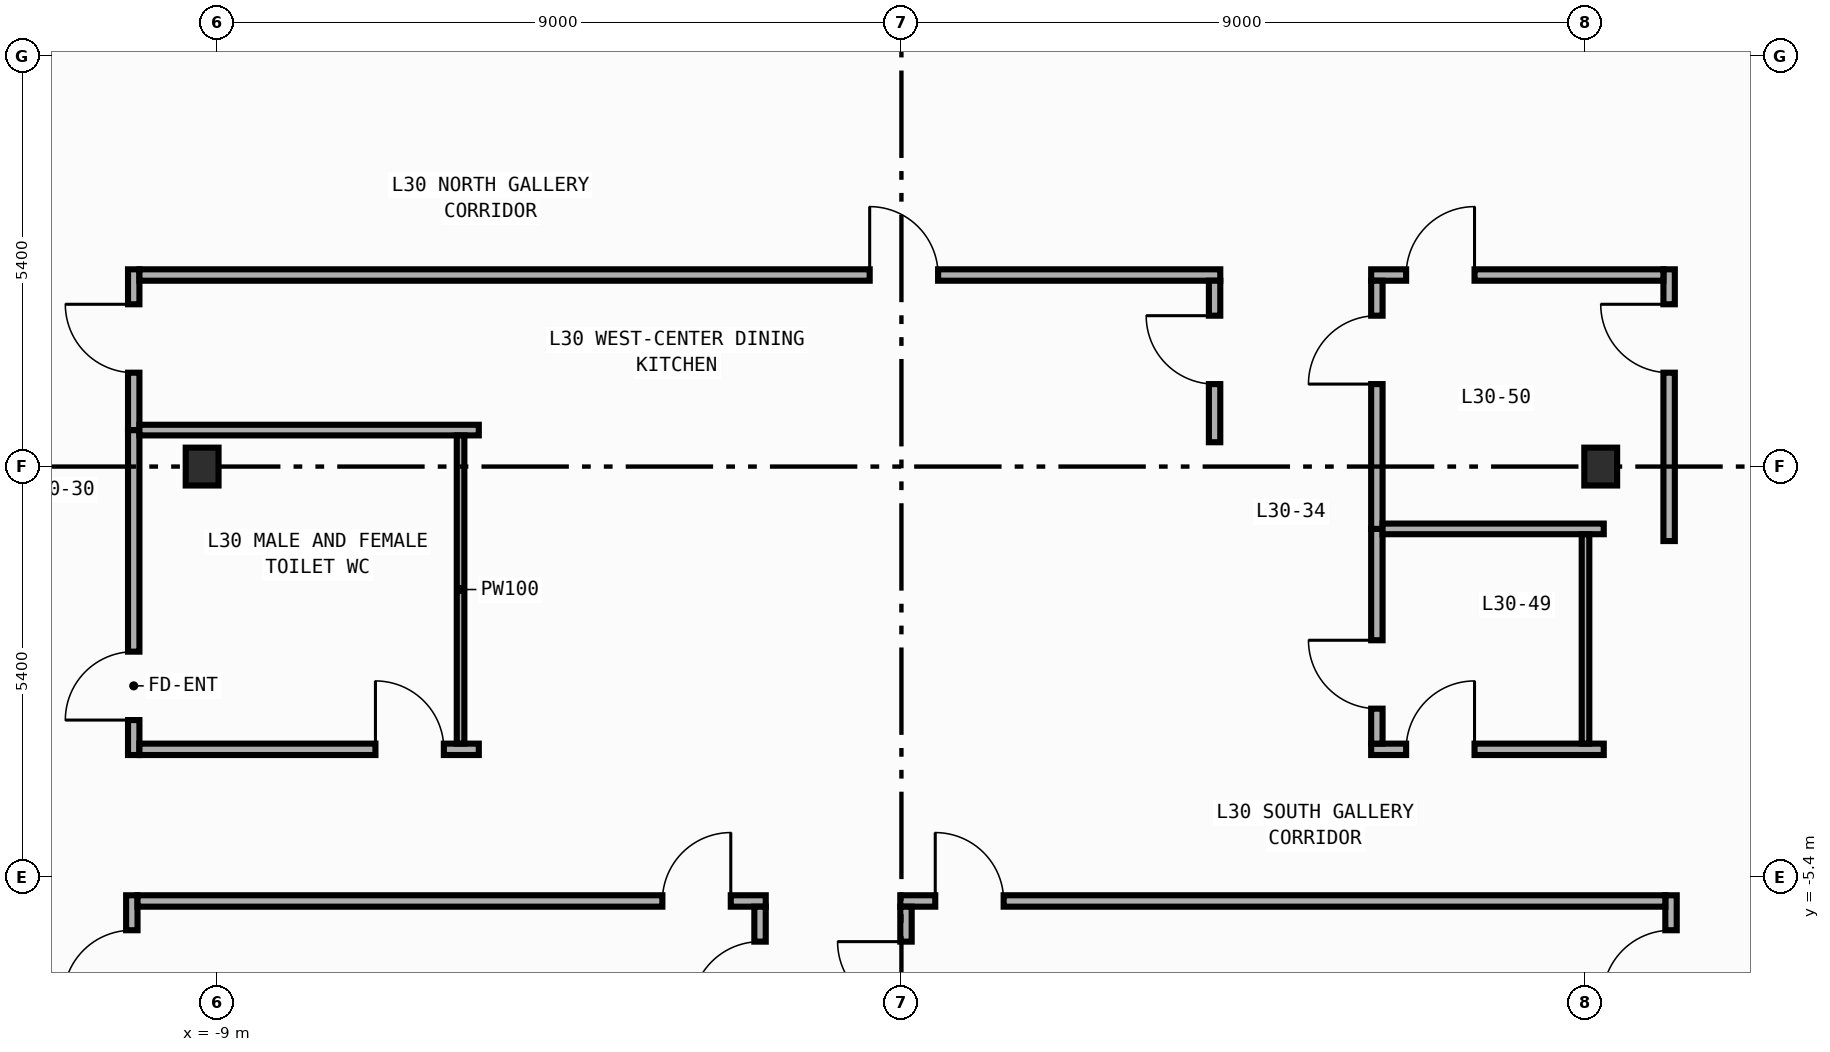
"""IFC4 building model, lengths in metres.
Left out: names, types, materials, properties, quantities, classifications, styles, units other than length and angle.
Written with IfcOpenShell. Run it as: python <this file> out.ifc"""

import sys

from ifc_helpers import new_model, si_unit, direction, frame, frame_2d, origin, origin_2d, place, context, subcontext, project, spatial, rectangle, i_section, extrude, element, fill, save


model = new_model("IFC4")
c1 = context("Model", 3, precision=1e-05, world=origin(), true_north=direction((0.0, 1.0)))
c2 = subcontext(c1, "Body", "Model", "MODEL_VIEW")
j1 = project(units=[si_unit("LENGTHUNIT", "METRE"), si_unit("PLANEANGLEUNIT", "RADIAN")], contexts=[c1])
p1 = place(None, origin())
s1 = spatial("IfcSite", under=j1, at=p1, CompositionType="ELEMENT")
p2 = place(p1, origin())
s2 = spatial("IfcBuilding", under=s1, at=p2, CompositionType="ELEMENT")
p3 = place(p2, frame((0.0, 0.0, 131.0)))
s3 = spatial("IfcBuildingStorey", under=s2, at=p3, CompositionType="ELEMENT", Elevation=131.0)
for number, where, z_axis, x_axis in (
    (1, (-9.2, 0.0, 0.0), (0.0, 0.0, 1.0), (1.0, 0.0, 0.0)),
    (2, (9.2, 0.0, 0.0), (0.0, 0.0, 1.0), (1.0, 0.0, 0.0)),
):
    element("IfcColumn", number, at=place(p3, frame(where, z_axis=z_axis, x_axis=x_axis)), inside=s3, PredefinedType="COLUMN", context=c2, shape_type="SweptSolid", body=[
        extrude(i_section(OverallWidth=0.432, OverallDepth=0.498, WebThickness=0.045, FlangeThickness=0.07, FilletRadius=0.022, at=origin_2d()), origin(), (0.0, 0.0, 1.0), 4.2),
    ])
p4 = place(p3, frame((-10.1, -3.795, 0.0), z_axis=(0.0, 0.0, 1.0), x_axis=(0.0, 1.0, 0.0)))
e3 = element("IfcWall", 3, at=p4, inside=s3, PredefinedType="PARTITIONING", context=c2, shape_type="SweptSolid", body=[
    extrude(rectangle(XDim=4.275, YDim=0.15, at=frame_2d((2.137, 0.0))), origin(), (0.0, 0.0, 1.0), 3.94),
])
p5 = place(p4, frame((0.46, 0.0, 0.0)))
e4 = element("IfcOpeningElement", 4, at=p5, cuts=e3, PredefinedType="OPENING", context=c2, shape_type="SweptSolid", body=[
    extrude(rectangle(XDim=0.9, YDim=2.15, at=frame_2d((0.45, 1.075))), frame((0.0, 0.085, 0.0), z_axis=(0.0, -1.0, 0.0), x_axis=(1.0, 0.0, 0.0)), (0.0, 0.0, 1.0), 0.17),
])
p6 = place(p3, frame((-10.1, 0.48, 0.0), z_axis=(0.0, 0.0, 1.0), x_axis=(0.0, 1.0, 0.0)))
e5 = element("IfcWall", 5, at=p6, inside=s3, PredefinedType="PARTITIONING", context=c2, shape_type="SweptSolid", body=[
    extrude(rectangle(XDim=2.115, YDim=0.15, at=frame_2d((1.058, 0.0))), origin(), (0.0, 0.0, 1.0), 3.94),
])
p7 = place(p6, frame((0.755, 0.0, 0.0)))
e6 = element("IfcOpeningElement", 6, at=p7, cuts=e5, PredefinedType="OPENING", context=c2, shape_type="SweptSolid", body=[
    extrude(rectangle(XDim=0.9, YDim=2.15, at=frame_2d((0.45, 1.075))), frame((0.0, 0.085, 0.0), z_axis=(0.0, -1.0, 0.0), x_axis=(1.0, 0.0, 0.0)), (0.0, 0.0, 1.0), 0.17),
])
p8 = place(p3, frame((-10.125, -12.44, 0.0), z_axis=(0.0, 0.0, 1.0), x_axis=(0.0, 1.0, 0.0)))
e7 = element("IfcWall", 7, at=p8, inside=s3, PredefinedType="PARTITIONING", context=c2, shape_type="SweptSolid", body=[
    extrude(rectangle(XDim=6.8, YDim=0.15, at=frame_2d((3.4, 0.0))), origin(), (0.0, 0.0, 1.0), 3.94),
])
p9 = place(p8, frame((5.44, 0.0, 0.0)))
e8 = element("IfcOpeningElement", 8, at=p9, cuts=e7, PredefinedType="OPENING", context=c2, shape_type="SweptSolid", body=[
    extrude(rectangle(XDim=0.9, YDim=2.15, at=frame_2d((0.45, 1.075))), frame((0.0, 0.085, 0.0), z_axis=(0.0, -1.0, 0.0), x_axis=(1.0, 0.0, 0.0)), (0.0, 0.0, 1.0), 0.17),
])
p10 = place(p3, frame((10.1, -0.98, 0.0), z_axis=(0.0, 0.0, 1.0), x_axis=(0.0, 1.0, 0.0)))
e9 = element("IfcWall", 9, at=p10, inside=s3, PredefinedType="PARTITIONING", context=c2, shape_type="SweptSolid", body=[
    extrude(rectangle(XDim=3.575, YDim=0.15, at=frame_2d((1.788, 0.0))), origin(), (0.0, 0.0, 1.0), 3.94),
])
p11 = place(p10, frame((2.215, 0.0, 0.0)))
e10 = element("IfcOpeningElement", 10, at=p11, cuts=e9, PredefinedType="OPENING", context=c2, shape_type="SweptSolid", body=[
    extrude(rectangle(XDim=0.9, YDim=2.15, at=frame_2d((0.45, 1.075))), frame((0.0, 0.085, 0.0), z_axis=(0.0, -1.0, 0.0), x_axis=(1.0, 0.0, 0.0)), (0.0, 0.0, 1.0), 0.17),
])
p12 = place(p3, frame((10.125, -14.44, 0.0), z_axis=(0.0, 0.0, 1.0), x_axis=(0.0, 1.0, 0.0)))
e11 = element("IfcWall", 11, at=p12, inside=s3, PredefinedType="PARTITIONING", context=c2, shape_type="SweptSolid", body=[
    extrude(rectangle(XDim=8.8, YDim=0.15, at=frame_2d((4.4, 0.0))), origin(), (0.0, 0.0, 1.0), 3.94),
])
p13 = place(p12, frame((7.44, 0.0, 0.0)))
e12 = element("IfcOpeningElement", 12, at=p13, cuts=e11, PredefinedType="OPENING", context=c2, shape_type="SweptSolid", body=[
    extrude(rectangle(XDim=0.9, YDim=2.15, at=frame_2d((0.45, 1.075))), frame((0.0, 0.085, 0.0), z_axis=(0.0, -1.0, 0.0), x_axis=(1.0, 0.0, 0.0)), (0.0, 0.0, 1.0), 0.17),
])
p14 = place(p3, frame((6.18, 2.52, 0.0), z_axis=(0.0, 0.0, 1.0), x_axis=(1.0, 0.0, 0.0)))
e13 = element("IfcWall", 13, at=p14, inside=s3, PredefinedType="PARTITIONING", context=c2, shape_type="SweptSolid", body=[
    extrude(rectangle(XDim=3.845, YDim=0.15, at=frame_2d((1.922, 0.0))), origin(), (0.0, 0.0, 1.0), 3.94),
])
p15 = place(p14, frame((0.46, 0.0, 0.0)))
e14 = element("IfcOpeningElement", 14, at=p15, cuts=e13, PredefinedType="OPENING", context=c2, shape_type="SweptSolid", body=[
    extrude(rectangle(XDim=0.9, YDim=2.15, at=frame_2d((0.45, 1.075))), frame((0.0, 0.085, 0.0), z_axis=(0.0, -1.0, 0.0), x_axis=(1.0, 0.0, 0.0)), (0.0, 0.0, 1.0), 0.17),
])
p16 = place(p3, frame((-10.025, 2.52, 0.0), z_axis=(0.0, 0.0, 1.0), x_axis=(1.0, 0.0, 0.0)))
e15 = element("IfcWall", 15, at=p16, inside=s3, PredefinedType="PARTITIONING", context=c2, shape_type="SweptSolid", body=[
    extrude(rectangle(XDim=14.22, YDim=0.15, at=frame_2d((7.11, 0.0))), origin(), (0.0, 0.0, 1.0), 3.94),
])
p17 = place(p16, frame((9.607, 0.0, 0.0)))
e16 = element("IfcOpeningElement", 16, at=p17, cuts=e15, PredefinedType="OPENING", context=c2, shape_type="SweptSolid", body=[
    extrude(rectangle(XDim=0.9, YDim=2.15, at=frame_2d((0.45, 1.075))), frame((0.0, 0.085, 0.0), z_axis=(0.0, -1.0, 0.0), x_axis=(1.0, 0.0, 0.0)), (0.0, 0.0, 1.0), 0.17),
])
p18 = place(p3, frame((6.18, -3.72, 0.0), z_axis=(0.0, 0.0, 1.0), x_axis=(1.0, 0.0, 0.0)))
e17 = element("IfcWall", 17, at=p18, inside=s3, PredefinedType="PARTITIONING", context=c2, shape_type="SweptSolid", body=[
    extrude(rectangle(XDim=3.06, YDim=0.15, at=frame_2d((1.53, 0.0))), origin(), (0.0, 0.0, 1.0), 3.94),
])
p19 = place(p18, frame((0.46, 0.0, 0.0)))
e18 = element("IfcOpeningElement", 18, at=p19, cuts=e17, PredefinedType="OPENING", context=c2, shape_type="SweptSolid", body=[
    extrude(rectangle(XDim=0.9, YDim=2.15, at=frame_2d((0.45, 1.075))), frame((0.0, 0.085, 0.0), z_axis=(0.0, -1.0, 0.0), x_axis=(1.0, 0.0, 0.0)), (0.0, 0.0, 1.0), 0.17),
])
p20 = place(p3, frame((-10.025, -3.72, 0.0), z_axis=(0.0, 0.0, 1.0), x_axis=(1.0, 0.0, 0.0)))
e19 = element("IfcWall", 19, at=p20, inside=s3, PredefinedType="PARTITIONING", context=c2, shape_type="SweptSolid", body=[
    extrude(rectangle(XDim=4.465, YDim=0.15, at=frame_2d((2.232, 0.0))), origin(), (0.0, 0.0, 1.0), 3.94),
])
p21 = place(p20, frame((3.105, 0.0, 0.0)))
e20 = element("IfcOpeningElement", 20, at=p21, cuts=e19, PredefinedType="OPENING", context=c2, shape_type="SweptSolid", body=[
    extrude(rectangle(XDim=0.9, YDim=2.15, at=frame_2d((0.45, 1.075))), frame((0.0, 0.085, 0.0), z_axis=(0.0, -1.0, 0.0), x_axis=(1.0, 0.0, 0.0)), (0.0, 0.0, 1.0), 0.17),
])
p22 = place(p3, frame((-10.05, -5.715, 0.0), z_axis=(0.0, 0.0, 1.0), x_axis=(1.0, 0.0, 0.0)))
e21 = element("IfcWall", 21, at=p22, inside=s3, PredefinedType="PARTITIONING", context=c2, shape_type="SweptSolid", body=[
    extrude(rectangle(XDim=8.265, YDim=0.15, at=frame_2d((4.133, 0.0))), origin(), (0.0, 0.0, 1.0), 3.94),
])
p23 = place(p22, frame((6.905, 0.0, 0.0)))
e22 = element("IfcOpeningElement", 22, at=p23, cuts=e21, PredefinedType="OPENING", context=c2, shape_type="SweptSolid", body=[
    extrude(rectangle(XDim=0.9, YDim=2.15, at=frame_2d((0.45, 1.075))), frame((0.0, 0.085, 0.0), z_axis=(0.0, -1.0, 0.0), x_axis=(1.0, 0.0, 0.0)), (0.0, 0.0, 1.0), 0.17),
])
p24 = place(p3, frame((-0.015, -5.715, 0.0), z_axis=(0.0, 0.0, 1.0), x_axis=(1.0, 0.0, 0.0)))
e23 = element("IfcWall", 23, at=p24, inside=s3, PredefinedType="PARTITIONING", context=c2, shape_type="SweptSolid", body=[
    extrude(rectangle(XDim=10.065, YDim=0.15, at=frame_2d((5.032, 0.0))), origin(), (0.0, 0.0, 1.0), 3.94),
])
p25 = place(p24, frame((0.46, 0.0, 0.0)))
e24 = element("IfcOpeningElement", 24, at=p25, cuts=e23, PredefinedType="OPENING", context=c2, shape_type="SweptSolid", body=[
    extrude(rectangle(XDim=0.9, YDim=2.15, at=frame_2d((0.45, 1.075))), frame((0.0, 0.085, 0.0), z_axis=(0.0, -1.0, 0.0), x_axis=(1.0, 0.0, 0.0)), (0.0, 0.0, 1.0), 0.17),
])
p26 = place(p3, frame((6.255, -3.645, 0.0), z_axis=(0.0, 0.0, 1.0), x_axis=(0.0, 1.0, 0.0)))
e25 = element("IfcWall", 25, at=p26, inside=s3, PredefinedType="PARTITIONING", context=c2, shape_type="SweptSolid", body=[
    extrude(rectangle(XDim=2.825, YDim=0.15, at=frame_2d((1.413, 0.0))), origin(), (0.0, 0.0, 1.0), 3.94),
])
p27 = place(p26, frame((0.46, 0.0, 0.0)))
e26 = element("IfcOpeningElement", 26, at=p27, cuts=e25, PredefinedType="OPENING", context=c2, shape_type="SweptSolid", body=[
    extrude(rectangle(XDim=0.9, YDim=2.15, at=frame_2d((0.45, 1.075))), frame((0.0, 0.085, 0.0), z_axis=(0.0, -1.0, 0.0), x_axis=(1.0, 0.0, 0.0)), (0.0, 0.0, 1.0), 0.17),
])
p28 = place(p3, frame((6.255, -0.82, 0.0), z_axis=(0.0, 0.0, 1.0), x_axis=(0.0, 1.0, 0.0)))
e27 = element("IfcWall", 27, at=p28, inside=s3, PredefinedType="PARTITIONING", context=c2, shape_type="SweptSolid", body=[
    extrude(rectangle(XDim=3.265, YDim=0.15, at=frame_2d((1.633, 0.0))), origin(), (0.0, 0.0, 1.0), 3.94),
])
p29 = place(p28, frame((1.905, 0.0, 0.0)))
e28 = element("IfcOpeningElement", 28, at=p29, cuts=e27, PredefinedType="OPENING", context=c2, shape_type="SweptSolid", body=[
    extrude(rectangle(XDim=0.9, YDim=2.15, at=frame_2d((0.45, 1.075))), frame((0.0, 0.085, 0.0), z_axis=(0.0, -1.0, 0.0), x_axis=(1.0, 0.0, 0.0)), (0.0, 0.0, 1.0), 0.17),
])
p30 = place(p3, frame((4.12, 0.32, 0.0), z_axis=(0.0, 0.0, 1.0), x_axis=(0.0, 1.0, 0.0)))
e29 = element("IfcWall", 29, at=p30, inside=s3, PredefinedType="PARTITIONING", context=c2, shape_type="SweptSolid", body=[
    extrude(rectangle(XDim=2.125, YDim=0.15, at=frame_2d((1.062, 0.0))), origin(), (0.0, 0.0, 1.0), 3.94),
])
p31 = place(p30, frame((0.765, 0.0, 0.0)))
e30 = element("IfcOpeningElement", 30, at=p31, cuts=e29, PredefinedType="OPENING", context=c2, shape_type="SweptSolid", body=[
    extrude(rectangle(XDim=0.9, YDim=2.15, at=frame_2d((0.45, 1.075))), frame((0.0, 0.085, 0.0), z_axis=(0.0, -1.0, 0.0), x_axis=(1.0, 0.0, 0.0)), (0.0, 0.0, 1.0), 0.17),
])
p32 = place(p3, frame((-1.86, -14.865, 0.0), z_axis=(0.0, 0.0, 1.0), x_axis=(0.0, 1.0, 0.0)))
e31 = element("IfcWall", 31, at=p32, inside=s3, PredefinedType="PARTITIONING", context=c2, shape_type="SweptSolid", body=[
    extrude(rectangle(XDim=9.075, YDim=0.15, at=frame_2d((4.538, 0.0))), origin(), (0.0, 0.0, 1.0), 3.94),
])
p33 = place(p32, frame((7.715, 0.0, 0.0)))
e32 = element("IfcOpeningElement", 32, at=p33, cuts=e31, PredefinedType="OPENING", context=c2, shape_type="SweptSolid", body=[
    extrude(rectangle(XDim=0.9, YDim=2.15, at=frame_2d((0.45, 1.075))), frame((0.0, 0.085, 0.0), z_axis=(0.0, -1.0, 0.0), x_axis=(1.0, 0.0, 0.0)), (0.0, 0.0, 1.0), 0.17),
])
p34 = place(p3, frame((0.06, -14.865, 0.0), z_axis=(0.0, 0.0, 1.0), x_axis=(0.0, 1.0, 0.0)))
e33 = element("IfcWall", 33, at=p34, inside=s3, PredefinedType="PARTITIONING", context=c2, shape_type="SweptSolid", body=[
    extrude(rectangle(XDim=9.075, YDim=0.15, at=frame_2d((4.538, 0.0))), origin(), (0.0, 0.0, 1.0), 3.94),
])
p35 = place(p34, frame((7.715, 0.0, 0.0)))
e34 = element("IfcOpeningElement", 34, at=p35, cuts=e33, PredefinedType="OPENING", context=c2, shape_type="SweptSolid", body=[
    extrude(rectangle(XDim=0.9, YDim=2.15, at=frame_2d((0.45, 1.075))), frame((0.0, 0.085, 0.0), z_axis=(0.0, -1.0, 0.0), x_axis=(1.0, 0.0, 0.0)), (0.0, 0.0, 1.0), 0.17),
])
p36 = place(p3, frame((6.33, -0.82, 0.0), z_axis=(0.0, 0.0, 1.0), x_axis=(1.0, 0.0, 0.0)))
e35 = element("IfcWall", 35, at=p36, inside=s3, PredefinedType="PARTITIONING", context=c2, shape_type="SweptSolid", body=[
    extrude(rectangle(XDim=2.91, YDim=0.14, at=frame_2d((1.455, 0.0))), origin(), (0.0, 0.0, 1.0), 3.94),
])
p37 = place(p3, frame((-10.025, 0.48, 0.0), z_axis=(0.0, 0.0, 1.0), x_axis=(1.0, 0.0, 0.0)))
e36 = element("IfcWall", 36, at=p37, inside=s3, PredefinedType="PARTITIONING", context=c2, shape_type="SweptSolid", body=[
    extrude(rectangle(XDim=4.465, YDim=0.14, at=frame_2d((2.232, 0.0))), origin(), (0.0, 0.0, 1.0), 3.94),
])
p38 = place(p3, frame((9.0, -0.89, 0.0), z_axis=(0.0, 0.0, 1.0), x_axis=(0.0, -1.0, 0.0)))
e37 = element("IfcWall", 37, at=p38, inside=s3, PredefinedType="PARTITIONING", context=c2, shape_type="SweptSolid", body=[
    extrude(rectangle(XDim=2.755, YDim=0.1, at=frame_2d((1.377, 0.0))), origin(), (0.0, 0.0, 1.0), 3.24),
])
p39 = place(p3, frame((-5.8, 0.41, 0.0), z_axis=(0.0, 0.0, 1.0), x_axis=(0.0, -1.0, 0.0)))
e38 = element("IfcWall", 38, at=p39, inside=s3, PredefinedType="PARTITIONING", context=c2, shape_type="SweptSolid", body=[
    extrude(rectangle(XDim=4.055, YDim=0.1, at=frame_2d((2.027, 0.0))), origin(), (0.0, 0.0, 1.0), 3.94),
])
p40 = place(p5, origin())
e39 = element("IfcDoor", 39, at=p40, inside=s3, OperationType="SINGLE_SWING_LEFT", PredefinedType="DOOR", context=c2, shape_type="SweptSolid", body=[
    extrude(rectangle(XDim=0.9, YDim=2.15, at=frame_2d((0.45, 1.075))), frame((0.0, 0.025, 0.0), z_axis=(0.0, -1.0, 0.0), x_axis=(1.0, 0.0, 0.0)), (0.0, 0.0, 1.0), 0.05),
])
fill(e4, e39)
p41 = place(p7, origin())
e40 = element("IfcDoor", 40, at=p41, inside=s3, OperationType="SINGLE_SWING_RIGHT", PredefinedType="DOOR", context=c2, shape_type="SweptSolid", body=[
    extrude(rectangle(XDim=0.9, YDim=2.15, at=frame_2d((0.45, 1.075))), frame((0.0, 0.025, 0.0), z_axis=(0.0, -1.0, 0.0), x_axis=(1.0, 0.0, 0.0)), (0.0, 0.0, 1.0), 0.05),
])
fill(e6, e40)
p42 = place(p9, origin())
e41 = element("IfcDoor", 41, at=p42, inside=s3, OperationType="SINGLE_SWING_LEFT", PredefinedType="DOOR", context=c2, shape_type="SweptSolid", body=[
    extrude(rectangle(XDim=0.9, YDim=2.15, at=frame_2d((0.45, 1.075))), frame((0.0, 0.025, 0.0), z_axis=(0.0, -1.0, 0.0), x_axis=(1.0, 0.0, 0.0)), (0.0, 0.0, 1.0), 0.05),
])
fill(e8, e41)
p43 = place(p11, origin())
e42 = element("IfcDoor", 42, at=p43, inside=s3, OperationType="SINGLE_SWING_RIGHT", PredefinedType="DOOR", context=c2, shape_type="SweptSolid", body=[
    extrude(rectangle(XDim=0.9, YDim=2.15, at=frame_2d((0.45, 1.075))), frame((0.0, 0.025, 0.0), z_axis=(0.0, -1.0, 0.0), x_axis=(1.0, 0.0, 0.0)), (0.0, 0.0, 1.0), 0.05),
])
fill(e10, e42)
p44 = place(p13, origin())
e43 = element("IfcDoor", 43, at=p44, inside=s3, OperationType="SINGLE_SWING_LEFT", PredefinedType="DOOR", context=c2, shape_type="SweptSolid", body=[
    extrude(rectangle(XDim=0.9, YDim=2.15, at=frame_2d((0.45, 1.075))), frame((0.0, 0.025, 0.0), z_axis=(0.0, -1.0, 0.0), x_axis=(1.0, 0.0, 0.0)), (0.0, 0.0, 1.0), 0.05),
])
fill(e12, e43)
p45 = place(p15, origin())
e44 = element("IfcDoor", 44, at=p45, inside=s3, OperationType="SINGLE_SWING_RIGHT", PredefinedType="DOOR", context=c2, shape_type="SweptSolid", body=[
    extrude(rectangle(XDim=0.9, YDim=2.15, at=frame_2d((0.45, 1.075))), frame((0.0, 0.025, 0.0), z_axis=(0.0, -1.0, 0.0), x_axis=(1.0, 0.0, 0.0)), (0.0, 0.0, 1.0), 0.05),
])
fill(e14, e44)
p46 = place(p17, origin())
e45 = element("IfcDoor", 45, at=p46, inside=s3, OperationType="SINGLE_SWING_LEFT", PredefinedType="DOOR", context=c2, shape_type="SweptSolid", body=[
    extrude(rectangle(XDim=0.9, YDim=2.15, at=frame_2d((0.45, 1.075))), frame((0.0, 0.025, 0.0), z_axis=(0.0, -1.0, 0.0), x_axis=(1.0, 0.0, 0.0)), (0.0, 0.0, 1.0), 0.05),
])
fill(e16, e45)
p47 = place(p19, origin())
e46 = element("IfcDoor", 46, at=p47, inside=s3, OperationType="SINGLE_SWING_RIGHT", PredefinedType="DOOR", context=c2, shape_type="SweptSolid", body=[
    extrude(rectangle(XDim=0.9, YDim=2.15, at=frame_2d((0.45, 1.075))), frame((0.0, 0.025, 0.0), z_axis=(0.0, -1.0, 0.0), x_axis=(1.0, 0.0, 0.0)), (0.0, 0.0, 1.0), 0.05),
])
fill(e18, e46)
p48 = place(p21, origin())
e47 = element("IfcDoor", 47, at=p48, inside=s3, OperationType="SINGLE_SWING_LEFT", PredefinedType="DOOR", context=c2, shape_type="SweptSolid", body=[
    extrude(rectangle(XDim=0.9, YDim=2.15, at=frame_2d((0.45, 1.075))), frame((0.0, 0.025, 0.0), z_axis=(0.0, -1.0, 0.0), x_axis=(1.0, 0.0, 0.0)), (0.0, 0.0, 1.0), 0.05),
])
fill(e20, e47)
p49 = place(p23, origin())
e48 = element("IfcDoor", 48, at=p49, inside=s3, OperationType="SINGLE_SWING_RIGHT", PredefinedType="DOOR", context=c2, shape_type="SweptSolid", body=[
    extrude(rectangle(XDim=0.9, YDim=2.15, at=frame_2d((0.45, 1.075))), frame((0.0, 0.025, 0.0), z_axis=(0.0, -1.0, 0.0), x_axis=(1.0, 0.0, 0.0)), (0.0, 0.0, 1.0), 0.05),
])
fill(e22, e48)
p50 = place(p25, origin())
e49 = element("IfcDoor", 49, at=p50, inside=s3, OperationType="SINGLE_SWING_LEFT", PredefinedType="DOOR", context=c2, shape_type="SweptSolid", body=[
    extrude(rectangle(XDim=0.9, YDim=2.15, at=frame_2d((0.45, 1.075))), frame((0.0, 0.025, 0.0), z_axis=(0.0, -1.0, 0.0), x_axis=(1.0, 0.0, 0.0)), (0.0, 0.0, 1.0), 0.05),
])
fill(e24, e49)
p51 = place(p27, origin())
e50 = element("IfcDoor", 50, at=p51, inside=s3, OperationType="SINGLE_SWING_RIGHT", PredefinedType="DOOR", context=c2, shape_type="SweptSolid", body=[
    extrude(rectangle(XDim=0.9, YDim=2.15, at=frame_2d((0.45, 1.075))), frame((0.0, 0.025, 0.0), z_axis=(0.0, -1.0, 0.0), x_axis=(1.0, 0.0, 0.0)), (0.0, 0.0, 1.0), 0.05),
])
fill(e26, e50)
p52 = place(p29, origin())
e51 = element("IfcDoor", 51, at=p52, inside=s3, OperationType="SINGLE_SWING_LEFT", PredefinedType="DOOR", context=c2, shape_type="SweptSolid", body=[
    extrude(rectangle(XDim=0.9, YDim=2.15, at=frame_2d((0.45, 1.075))), frame((0.0, 0.025, 0.0), z_axis=(0.0, -1.0, 0.0), x_axis=(1.0, 0.0, 0.0)), (0.0, 0.0, 1.0), 0.05),
])
fill(e28, e51)
p53 = place(p31, origin())
e52 = element("IfcDoor", 52, at=p53, inside=s3, OperationType="SINGLE_SWING_RIGHT", PredefinedType="DOOR", context=c2, shape_type="SweptSolid", body=[
    extrude(rectangle(XDim=0.9, YDim=2.15, at=frame_2d((0.45, 1.075))), frame((0.0, 0.025, 0.0), z_axis=(0.0, -1.0, 0.0), x_axis=(1.0, 0.0, 0.0)), (0.0, 0.0, 1.0), 0.05),
])
fill(e30, e52)
p54 = place(p33, origin())
e53 = element("IfcDoor", 53, at=p54, inside=s3, OperationType="SINGLE_SWING_LEFT", PredefinedType="DOOR", context=c2, shape_type="SweptSolid", body=[
    extrude(rectangle(XDim=0.9, YDim=2.15, at=frame_2d((0.45, 1.075))), frame((0.0, 0.025, 0.0), z_axis=(0.0, -1.0, 0.0), x_axis=(1.0, 0.0, 0.0)), (0.0, 0.0, 1.0), 0.05),
])
fill(e32, e53)
p55 = place(p35, origin())
e54 = element("IfcDoor", 54, at=p55, inside=s3, OperationType="SINGLE_SWING_RIGHT", PredefinedType="DOOR", context=c2, shape_type="SweptSolid", body=[
    extrude(rectangle(XDim=0.9, YDim=2.15, at=frame_2d((0.45, 1.075))), frame((0.0, 0.025, 0.0), z_axis=(0.0, -1.0, 0.0), x_axis=(1.0, 0.0, 0.0)), (0.0, 0.0, 1.0), 0.05),
])
fill(e34, e54)
save(model, sys.argv[1])
